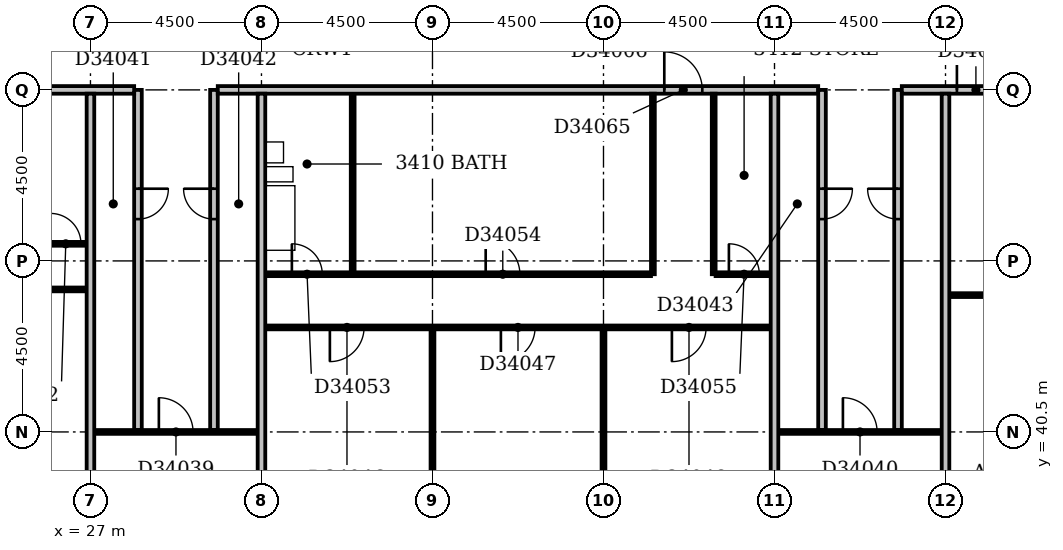
"""IFC4 building model, lengths in metres.
Left out: names, types, materials, properties, quantities, classifications, styles, units other than length and angle.
Written with IfcOpenShell. Run it as: python <this file> out.ifc"""

import sys

from ifc_helpers import new_model, si_unit, direction, frame, frame_2d, origin, place, context, subcontext, project, spatial, rectangle, extrude, element, fill, save


model = new_model("IFC4")
c1 = context("Model", 3, precision=1e-05, world=origin(), true_north=direction((0.0, 1.0)))
c2 = subcontext(c1, "Body", "Model", "MODEL_VIEW")
j1 = project(units=[si_unit("LENGTHUNIT", "METRE"), si_unit("PLANEANGLEUNIT", "RADIAN")], contexts=[c1])
p1 = place(None, origin())
s1 = spatial("IfcSite", under=j1, at=p1, CompositionType="ELEMENT")
p2 = place(p1, origin())
s2 = spatial("IfcBuilding", under=s1, at=p2, CompositionType="ELEMENT")
p3 = place(p2, frame((0.0, 0.0, 137.6)))
s3 = spatial("IfcBuildingStorey", under=s2, at=p3, CompositionType="ELEMENT", Elevation=137.6)
p4 = place(p3, frame((27.0, 36.5, 0.0), z_axis=(0.0, 0.0, 1.0), x_axis=(0.0, 1.0, 0.0)))
e1 = element("IfcWall", 1, at=p4, inside=s3, PredefinedType="PARTITIONING", context=c2, shape_type="SweptSolid", body=[
    extrude(rectangle(XDim=12.9, YDim=0.2, at=frame_2d((6.45, 0.0))), origin(), (0.0, 0.0, 1.0), 2.6),
])
p5 = place(p3, frame((31.5, 36.5, 0.0), z_axis=(0.0, 0.0, 1.0), x_axis=(0.0, 1.0, 0.0)))
e2 = element("IfcWall", 2, at=p5, inside=s3, PredefinedType="PARTITIONING", context=c2, shape_type="SweptSolid", body=[
    extrude(rectangle(XDim=12.9, YDim=0.2, at=frame_2d((6.45, 0.0))), origin(), (0.0, 0.0, 1.0), 3.3),
])
p6 = place(p3, frame((36.0, 36.5, 0.0), z_axis=(0.0, 0.0, 1.0), x_axis=(0.0, 1.0, 0.0)))
e3 = element("IfcWall", 3, at=p6, inside=s3, PredefinedType="PARTITIONING", context=c2, shape_type="SweptSolid", body=[
    extrude(rectangle(XDim=6.7, YDim=0.1, at=frame_2d((3.35, 0.0))), origin(), (0.0, 0.0, 1.0), 2.4),
])
p7 = place(p3, frame((40.5, 36.5, 0.0), z_axis=(0.0, 0.0, 1.0), x_axis=(0.0, 1.0, 0.0)))
e4 = element("IfcWall", 4, at=p7, inside=s3, PredefinedType="PARTITIONING", context=c2, shape_type="SweptSolid", body=[
    extrude(rectangle(XDim=6.7, YDim=0.1, at=frame_2d((3.35, 0.0))), origin(), (0.0, 0.0, 1.0), 3.3),
])
p8 = place(p3, frame((45.0, 36.5, 0.0), z_axis=(0.0, 0.0, 1.0), x_axis=(0.0, 1.0, 0.0)))
e5 = element("IfcWall", 5, at=p8, inside=s3, PredefinedType="PARTITIONING", context=c2, shape_type="SweptSolid", body=[
    extrude(rectangle(XDim=12.9, YDim=0.2, at=frame_2d((6.45, 0.0))), origin(), (0.0, 0.0, 1.0), 2.6),
])
p9 = place(p3, frame((49.5, 36.5, 0.0), z_axis=(0.0, 0.0, 1.0), x_axis=(0.0, 1.0, 0.0)))
e6 = element("IfcWall", 6, at=p9, inside=s3, PredefinedType="PARTITIONING", context=c2, shape_type="SweptSolid", body=[
    extrude(rectangle(XDim=12.9, YDim=0.2, at=frame_2d((6.45, 0.0))), origin(), (0.0, 0.0, 1.0), 3.3),
])
p10 = place(p3, frame((27.1, 40.5, 0.0), z_axis=(0.0, 0.0, 1.0), x_axis=(1.0, 0.0, 0.0)))
e7 = element("IfcWall", 7, at=p10, inside=s3, PredefinedType="PARTITIONING", context=c2, shape_type="SweptSolid", body=[
    extrude(rectangle(XDim=4.3, YDim=0.1, at=frame_2d((2.15, 0.0))), origin(), (0.0, 0.0, 1.0), 3.3),
])
p11 = place(p10, frame((1.7, 0.0, 0.0)))
e8 = element("IfcOpeningElement", 8, at=p11, cuts=e7, PredefinedType="OPENING", context=c2, shape_type="SweptSolid", body=[
    extrude(rectangle(XDim=0.9, YDim=2.1, at=frame_2d((0.45, 1.05))), frame((0.0, 0.062, 0.0), z_axis=(0.0, -1.0, 0.0), x_axis=(1.0, 0.0, 0.0)), (0.0, 0.0, 1.0), 0.124),
])
p12 = place(p3, frame((45.1, 40.5, 0.0), z_axis=(0.0, 0.0, 1.0), x_axis=(1.0, 0.0, 0.0)))
e9 = element("IfcWall", 9, at=p12, inside=s3, PredefinedType="PARTITIONING", context=c2, shape_type="SweptSolid", body=[
    extrude(rectangle(XDim=4.3, YDim=0.1, at=frame_2d((2.15, 0.0))), origin(), (0.0, 0.0, 1.0), 3.3),
])
p13 = place(p12, frame((1.7, 0.0, 0.0)))
e10 = element("IfcOpeningElement", 10, at=p13, cuts=e9, PredefinedType="OPENING", context=c2, shape_type="SweptSolid", body=[
    extrude(rectangle(XDim=0.9, YDim=2.1, at=frame_2d((0.45, 1.05))), frame((0.0, 0.062, 0.0), z_axis=(0.0, -1.0, 0.0), x_axis=(1.0, 0.0, 0.0)), (0.0, 0.0, 1.0), 0.124),
])
p14 = place(p3, frame((28.25, 40.55, 0.0), z_axis=(0.0, 0.0, 1.0), x_axis=(0.0, 1.0, 0.0)))
e11 = element("IfcWall", 11, at=p14, inside=s3, PredefinedType="PARTITIONING", context=c2, shape_type="SweptSolid", body=[
    extrude(rectangle(XDim=8.95, YDim=0.2, at=frame_2d((4.475, 0.0))), origin(), (0.0, 0.0, 1.0), 3.3),
])
p15 = place(p14, frame((5.55, 0.0, 0.0)))
e12 = element("IfcOpeningElement", 12, at=p15, cuts=e11, PredefinedType="OPENING", context=c2, shape_type="SweptSolid", body=[
    extrude(rectangle(XDim=0.8, YDim=2.1, at=frame_2d((0.4, 1.05))), frame((0.0, 0.112, 0.0), z_axis=(0.0, -1.0, 0.0), x_axis=(1.0, 0.0, 0.0)), (0.0, 0.0, 1.0), 0.224),
])
p16 = place(p3, frame((30.25, 40.55, 0.0), z_axis=(0.0, 0.0, 1.0), x_axis=(0.0, 1.0, 0.0)))
e13 = element("IfcWall", 13, at=p16, inside=s3, PredefinedType="PARTITIONING", context=c2, shape_type="SweptSolid", body=[
    extrude(rectangle(XDim=8.95, YDim=0.2, at=frame_2d((4.475, 0.0))), origin(), (0.0, 0.0, 1.0), 3.3),
])
p17 = place(p16, frame((5.55, 0.0, 0.0)))
e14 = element("IfcOpeningElement", 14, at=p17, cuts=e13, PredefinedType="OPENING", context=c2, shape_type="SweptSolid", body=[
    extrude(rectangle(XDim=0.8, YDim=2.1, at=frame_2d((0.4, 1.05))), frame((0.0, 0.112, 0.0), z_axis=(0.0, -1.0, 0.0), x_axis=(1.0, 0.0, 0.0)), (0.0, 0.0, 1.0), 0.224),
])
p18 = place(p3, frame((46.25, 40.55, 0.0), z_axis=(0.0, 0.0, 1.0), x_axis=(0.0, 1.0, 0.0)))
e15 = element("IfcWall", 15, at=p18, inside=s3, PredefinedType="PARTITIONING", context=c2, shape_type="SweptSolid", body=[
    extrude(rectangle(XDim=8.95, YDim=0.2, at=frame_2d((4.475, 0.0))), origin(), (0.0, 0.0, 1.0), 3.3),
])
p19 = place(p18, frame((5.55, 0.0, 0.0)))
e16 = element("IfcOpeningElement", 16, at=p19, cuts=e15, PredefinedType="OPENING", context=c2, shape_type="SweptSolid", body=[
    extrude(rectangle(XDim=0.8, YDim=2.1, at=frame_2d((0.4, 1.05))), frame((0.0, 0.112, 0.0), z_axis=(0.0, -1.0, 0.0), x_axis=(1.0, 0.0, 0.0)), (0.0, 0.0, 1.0), 0.224),
])
p20 = place(p3, frame((48.25, 40.55, 0.0), z_axis=(0.0, 0.0, 1.0), x_axis=(0.0, 1.0, 0.0)))
e17 = element("IfcWall", 17, at=p20, inside=s3, PredefinedType="PARTITIONING", context=c2, shape_type="SweptSolid", body=[
    extrude(rectangle(XDim=8.95, YDim=0.2, at=frame_2d((4.475, 0.0))), origin(), (0.0, 0.0, 1.0), 3.3),
])
p21 = place(p20, frame((5.55, 0.0, 0.0)))
e18 = element("IfcOpeningElement", 18, at=p21, cuts=e17, PredefinedType="OPENING", context=c2, shape_type="SweptSolid", body=[
    extrude(rectangle(XDim=0.8, YDim=2.1, at=frame_2d((0.4, 1.05))), frame((0.0, 0.112, 0.0), z_axis=(0.0, -1.0, 0.0), x_axis=(1.0, 0.0, 0.0)), (0.0, 0.0, 1.0), 0.224),
])
p22 = place(p3, frame((31.6, 43.25, 0.0), z_axis=(0.0, 0.0, 1.0), x_axis=(1.0, 0.0, 0.0)))
e19 = element("IfcWall", 19, at=p22, inside=s3, PredefinedType="PARTITIONING", context=c2, shape_type="SweptSolid", body=[
    extrude(rectangle(XDim=13.3, YDim=0.1, at=frame_2d((6.65, 0.0))), origin(), (0.0, 0.0, 1.0), 3.3),
])
p23 = place(p22, frame((1.7, 0.0, 0.0)))
e20 = element("IfcOpeningElement", 20, at=p23, cuts=e19, PredefinedType="OPENING", context=c2, shape_type="SweptSolid", body=[
    extrude(rectangle(XDim=0.9, YDim=2.1, at=frame_2d((0.45, 1.05))), frame((0.0, 0.062, 0.0), z_axis=(0.0, -1.0, 0.0), x_axis=(1.0, 0.0, 0.0)), (0.0, 0.0, 1.0), 0.124),
])
p24 = place(p22, frame((6.2, 0.0, 0.0)))
e21 = element("IfcOpeningElement", 21, at=p24, cuts=e19, PredefinedType="OPENING", context=c2, shape_type="SweptSolid", body=[
    extrude(rectangle(XDim=0.9, YDim=2.1, at=frame_2d((0.45, 1.05))), frame((0.0, 0.062, 0.0), z_axis=(0.0, -1.0, 0.0), x_axis=(1.0, 0.0, 0.0)), (0.0, 0.0, 1.0), 0.124),
])
p25 = place(p22, frame((10.7, 0.0, 0.0)))
e22 = element("IfcOpeningElement", 22, at=p25, cuts=e19, PredefinedType="OPENING", context=c2, shape_type="SweptSolid", body=[
    extrude(rectangle(XDim=0.9, YDim=2.1, at=frame_2d((0.45, 1.05))), frame((0.0, 0.062, 0.0), z_axis=(0.0, -1.0, 0.0), x_axis=(1.0, 0.0, 0.0)), (0.0, 0.0, 1.0), 0.124),
])
p26 = place(p3, frame((49.6, 44.1, 0.0), z_axis=(0.0, 0.0, 1.0), x_axis=(1.0, 0.0, 0.0)))
e23 = element("IfcWall", 23, at=p26, inside=s3, PredefinedType="PARTITIONING", context=c2, shape_type="SweptSolid", body=[
    extrude(rectangle(XDim=18.5, YDim=0.1, at=frame_2d((9.25, 0.0))), origin(), (0.0, 0.0, 1.0), 3.3),
])
p27 = place(p26, frame((3.95, 0.0, 0.0)))
e24 = element("IfcOpeningElement", 24, at=p27, cuts=e23, PredefinedType="OPENING", context=c2, shape_type="SweptSolid", body=[
    extrude(rectangle(XDim=0.9, YDim=2.1, at=frame_2d((0.45, 1.05))), frame((0.0, 0.062, 0.0), z_axis=(0.0, -1.0, 0.0), x_axis=(1.0, 0.0, 0.0)), (0.0, 0.0, 1.0), 0.124),
])
p28 = place(p26, frame((10.7, 0.0, 0.0)))
e25 = element("IfcOpeningElement", 25, at=p28, cuts=e23, PredefinedType="OPENING", context=c2, shape_type="SweptSolid", body=[
    extrude(rectangle(XDim=0.9, YDim=2.1, at=frame_2d((0.45, 1.05))), frame((0.0, 0.062, 0.0), z_axis=(0.0, -1.0, 0.0), x_axis=(1.0, 0.0, 0.0)), (0.0, 0.0, 1.0), 0.124),
])
p29 = place(p26, frame((14.05, 0.0, 0.0)))
e26 = element("IfcOpeningElement", 26, at=p29, cuts=e23, PredefinedType="OPENING", context=c2, shape_type="SweptSolid", body=[
    extrude(rectangle(XDim=0.9, YDim=2.1, at=frame_2d((0.45, 1.05))), frame((0.0, 0.062, 0.0), z_axis=(0.0, -1.0, 0.0), x_axis=(1.0, 0.0, 0.0)), (0.0, 0.0, 1.0), 0.124),
])
p30 = place(p3, frame((22.6, 44.25, 0.0), z_axis=(0.0, 0.0, 1.0), x_axis=(1.0, 0.0, 0.0)))
e27 = element("IfcWall", 27, at=p30, inside=s3, PredefinedType="PARTITIONING", context=c2, shape_type="SweptSolid", body=[
    extrude(rectangle(XDim=4.3, YDim=0.1, at=frame_2d((2.15, 0.0))), origin(), (0.0, 0.0, 1.0), 3.3),
])
p31 = place(p30, frame((1.7, 0.0, 0.0)))
e28 = element("IfcOpeningElement", 28, at=p31, cuts=e27, PredefinedType="OPENING", context=c2, shape_type="SweptSolid", body=[
    extrude(rectangle(XDim=0.9, YDim=2.1, at=frame_2d((0.45, 1.05))), frame((0.0, 0.062, 0.0), z_axis=(0.0, -1.0, 0.0), x_axis=(1.0, 0.0, 0.0)), (0.0, 0.0, 1.0), 0.124),
])
p32 = place(p3, frame((31.6, 44.65, 0.0), z_axis=(0.0, 0.0, 1.0), x_axis=(1.0, 0.0, 0.0)))
e29 = element("IfcWall", 29, at=p32, inside=s3, PredefinedType="PARTITIONING", context=c2, shape_type="SweptSolid", body=[
    extrude(rectangle(XDim=10.15, YDim=0.1, at=frame_2d((5.075, 0.0))), origin(), (0.0, 0.0, 1.0), 3.3),
])
p33 = place(p32, frame((0.7, 0.0, 0.0)))
e30 = element("IfcOpeningElement", 30, at=p33, cuts=e29, PredefinedType="OPENING", context=c2, shape_type="SweptSolid", body=[
    extrude(rectangle(XDim=0.8, YDim=2.1, at=frame_2d((0.4, 1.05))), frame((0.0, 0.062, 0.0), z_axis=(0.0, -1.0, 0.0), x_axis=(1.0, 0.0, 0.0)), (0.0, 0.0, 1.0), 0.124),
])
p34 = place(p32, frame((5.8, 0.0, 0.0)))
e31 = element("IfcOpeningElement", 31, at=p34, cuts=e29, PredefinedType="OPENING", context=c2, shape_type="SweptSolid", body=[
    extrude(rectangle(XDim=0.9, YDim=2.1, at=frame_2d((0.45, 1.05))), frame((0.0, 0.062, 0.0), z_axis=(0.0, -1.0, 0.0), x_axis=(1.0, 0.0, 0.0)), (0.0, 0.0, 1.0), 0.124),
])
for number, where, z_axis, x_axis in (
    (32, (41.8, 44.65, 0.0), (0.0, 0.0, 1.0), (0.0, 1.0, 0.0)),
    (33, (43.4, 44.65, 0.0), (0.0, 0.0, 1.0), (0.0, 1.0, 0.0)),
):
    element("IfcWall", number, at=place(p3, frame(where, z_axis=z_axis, x_axis=x_axis)), inside=s3, PredefinedType="PARTITIONING", context=c2, shape_type="SweptSolid", body=[
        extrude(rectangle(XDim=4.75, YDim=0.1, at=frame_2d((2.375, 0.0))), origin(), (0.0, 0.0, 1.0), 3.3),
    ])
p35 = place(p3, frame((43.45, 44.65, 0.0), z_axis=(0.0, 0.0, 1.0), x_axis=(1.0, 0.0, 0.0)))
e34 = element("IfcWall", 34, at=p35, inside=s3, PredefinedType="PARTITIONING", context=c2, shape_type="SweptSolid", body=[
    extrude(rectangle(XDim=1.45, YDim=0.1, at=frame_2d((0.725, 0.0))), origin(), (0.0, 0.0, 1.0), 3.3),
])
p36 = place(p35, frame((0.35, 0.0, 0.0)))
e35 = element("IfcOpeningElement", 35, at=p36, cuts=e34, PredefinedType="OPENING", context=c2, shape_type="SweptSolid", body=[
    extrude(rectangle(XDim=0.8, YDim=2.1, at=frame_2d((0.4, 1.05))), frame((0.0, 0.062, 0.0), z_axis=(0.0, -1.0, 0.0), x_axis=(1.0, 0.0, 0.0)), (0.0, 0.0, 1.0), 0.124),
])
p37 = place(p3, frame((33.9, 44.7, 0.0), z_axis=(0.0, 0.0, 1.0), x_axis=(0.0, 1.0, 0.0)))
e36 = element("IfcWall", 36, at=p37, inside=s3, PredefinedType="PLUMBINGWALL", context=c2, shape_type="SweptSolid", body=[
    extrude(rectangle(XDim=4.7, YDim=0.1, at=frame_2d((2.35, 0.0))), origin(), (0.0, 0.0, 1.0), 3.3),
])
p38 = place(p3, frame((25.75, 45.45, 0.0), z_axis=(0.0, 0.0, 1.0), x_axis=(1.0, 0.0, 0.0)))
e37 = element("IfcWall", 37, at=p38, inside=s3, PredefinedType="PARTITIONING", context=c2, shape_type="SweptSolid", body=[
    extrude(rectangle(XDim=1.15, YDim=0.1, at=frame_2d((0.575, 0.0))), origin(), (0.0, 0.0, 1.0), 3.3),
])
p39 = place(p38, frame((0.2, 0.0, 0.0)))
e38 = element("IfcOpeningElement", 38, at=p39, cuts=e37, PredefinedType="OPENING", context=c2, shape_type="SweptSolid", body=[
    extrude(rectangle(XDim=0.8, YDim=2.1, at=frame_2d((0.4, 1.05))), frame((0.0, 0.062, 0.0), z_axis=(0.0, -1.0, 0.0), x_axis=(1.0, 0.0, 0.0)), (0.0, 0.0, 1.0), 0.124),
])
p40 = place(p3, frame((9.1, 49.5, 0.0), z_axis=(0.0, 0.0, 1.0), x_axis=(1.0, 0.0, 0.0)))
e39 = element("IfcWall", 39, at=p40, inside=s3, PredefinedType="PARTITIONING", context=c2, shape_type="SweptSolid", body=[
    extrude(rectangle(XDim=19.05, YDim=0.2, at=frame_2d((9.525, 0.0))), origin(), (0.0, 0.0, 1.0), 3.3),
])
p41 = place(p40, frame((15.35, 0.0, 0.0)))
e40 = element("IfcOpeningElement", 40, at=p41, cuts=e39, PredefinedType="OPENING", context=c2, shape_type="SweptSolid", body=[
    extrude(rectangle(XDim=1.0, YDim=2.1, at=frame_2d((0.5, 1.05))), frame((0.0, 0.112, 0.0), z_axis=(0.0, -1.0, 0.0), x_axis=(1.0, 0.0, 0.0)), (0.0, 0.0, 1.0), 0.224),
])
p42 = place(p40, frame((6.15, 0.0, 0.0)))
e41 = element("IfcOpeningElement", 41, at=p42, cuts=e39, PredefinedType="OPENING", context=c2, shape_type="SweptSolid", body=[
    extrude(rectangle(XDim=0.9, YDim=2.1, at=frame_2d((0.45, 1.05))), frame((0.0, 0.112, 0.0), z_axis=(0.0, -1.0, 0.0), x_axis=(1.0, 0.0, 0.0)), (0.0, 0.0, 1.0), 0.224),
])
p43 = place(p3, frame((30.35, 49.5, 0.0), z_axis=(0.0, 0.0, 1.0), x_axis=(1.0, 0.0, 0.0)))
e42 = element("IfcWall", 42, at=p43, inside=s3, PredefinedType="PARTITIONING", context=c2, shape_type="SweptSolid", body=[
    extrude(rectangle(XDim=15.8, YDim=0.2, at=frame_2d((7.9, 0.0))), origin(), (0.0, 0.0, 1.0), 3.3),
])
p44 = place(p43, frame((11.75, 0.0, 0.0)))
e43 = element("IfcOpeningElement", 43, at=p44, cuts=e42, PredefinedType="OPENING", context=c2, shape_type="SweptSolid", body=[
    extrude(rectangle(XDim=1.0, YDim=2.1, at=frame_2d((0.5, 1.05))), frame((0.0, 0.112, 0.0), z_axis=(0.0, -1.0, 0.0), x_axis=(1.0, 0.0, 0.0)), (0.0, 0.0, 1.0), 0.224),
])
p45 = place(p3, frame((48.35, 49.5, 0.0), z_axis=(0.0, 0.0, 1.0), x_axis=(1.0, 0.0, 0.0)))
e44 = element("IfcWall", 44, at=p45, inside=s3, PredefinedType="PARTITIONING", context=c2, shape_type="SweptSolid", body=[
    extrude(rectangle(XDim=18.65, YDim=0.2, at=frame_2d((9.325, 0.0))), origin(), (0.0, 0.0, 1.0), 3.3),
])
p46 = place(p45, frame((1.45, 0.0, 0.0)))
e45 = element("IfcOpeningElement", 45, at=p46, cuts=e44, PredefinedType="OPENING", context=c2, shape_type="SweptSolid", body=[
    extrude(rectangle(XDim=1.0, YDim=2.1, at=frame_2d((0.5, 1.05))), frame((0.0, 0.112, 0.0), z_axis=(0.0, -1.0, 0.0), x_axis=(1.0, 0.0, 0.0)), (0.0, 0.0, 1.0), 0.224),
])
p47 = place(p11, origin())
e46 = element("IfcDoor", 46, at=p47, inside=s3, OperationType="SINGLE_SWING_LEFT", PredefinedType="DOOR", context=c2, shape_type="SweptSolid", body=[
    extrude(rectangle(XDim=0.9, YDim=2.1, at=frame_2d((0.45, 1.05))), frame((0.0, 0.025, 0.0), z_axis=(0.0, -1.0, 0.0), x_axis=(1.0, 0.0, 0.0)), (0.0, 0.0, 1.0), 0.05),
])
fill(e8, e46)
p48 = place(p13, origin())
e47 = element("IfcDoor", 47, at=p48, inside=s3, OperationType="SINGLE_SWING_LEFT", PredefinedType="DOOR", context=c2, shape_type="SweptSolid", body=[
    extrude(rectangle(XDim=0.9, YDim=2.1, at=frame_2d((0.45, 1.05))), frame((0.0, 0.025, 0.0), z_axis=(0.0, -1.0, 0.0), x_axis=(1.0, 0.0, 0.0)), (0.0, 0.0, 1.0), 0.05),
])
fill(e10, e47)
p49 = place(p15, origin())
e48 = element("IfcDoor", 48, at=p49, inside=s3, OperationType="SINGLE_SWING_RIGHT", PredefinedType="DOOR", context=c2, shape_type="SweptSolid", body=[
    extrude(rectangle(XDim=0.8, YDim=2.1, at=frame_2d((0.4, 1.05))), frame((0.0, 0.025, 0.0), z_axis=(0.0, -1.0, 0.0), x_axis=(1.0, 0.0, 0.0)), (0.0, 0.0, 1.0), 0.05),
])
fill(e12, e48)
p50 = place(p17, frame((0.8, 0.0, 0.0), z_axis=(0.0, 0.0, 1.0), x_axis=(-1.0, 0.0, 0.0)))
e49 = element("IfcDoor", 49, at=p50, inside=s3, OperationType="SINGLE_SWING_LEFT", PredefinedType="DOOR", context=c2, shape_type="SweptSolid", body=[
    extrude(rectangle(XDim=0.8, YDim=2.1, at=frame_2d((0.4, 1.05))), frame((0.0, 0.025, 0.0), z_axis=(0.0, -1.0, 0.0), x_axis=(1.0, 0.0, 0.0)), (0.0, 0.0, 1.0), 0.05),
])
fill(e14, e49)
p51 = place(p19, origin())
e50 = element("IfcDoor", 50, at=p51, inside=s3, OperationType="SINGLE_SWING_RIGHT", PredefinedType="DOOR", context=c2, shape_type="SweptSolid", body=[
    extrude(rectangle(XDim=0.8, YDim=2.1, at=frame_2d((0.4, 1.05))), frame((0.0, 0.025, 0.0), z_axis=(0.0, -1.0, 0.0), x_axis=(1.0, 0.0, 0.0)), (0.0, 0.0, 1.0), 0.05),
])
fill(e16, e50)
p52 = place(p21, frame((0.8, 0.0, 0.0), z_axis=(0.0, 0.0, 1.0), x_axis=(-1.0, 0.0, 0.0)))
e51 = element("IfcDoor", 51, at=p52, inside=s3, OperationType="SINGLE_SWING_LEFT", PredefinedType="DOOR", context=c2, shape_type="SweptSolid", body=[
    extrude(rectangle(XDim=0.8, YDim=2.1, at=frame_2d((0.4, 1.05))), frame((0.0, 0.025, 0.0), z_axis=(0.0, -1.0, 0.0), x_axis=(1.0, 0.0, 0.0)), (0.0, 0.0, 1.0), 0.05),
])
fill(e18, e51)
p53 = place(p23, frame((0.9, 0.0, 0.0), z_axis=(0.0, 0.0, 1.0), x_axis=(-1.0, 0.0, 0.0)))
e52 = element("IfcDoor", 52, at=p53, inside=s3, OperationType="SINGLE_SWING_RIGHT", PredefinedType="DOOR", context=c2, shape_type="SweptSolid", body=[
    extrude(rectangle(XDim=0.9, YDim=2.1, at=frame_2d((0.45, 1.05))), frame((0.0, 0.025, 0.0), z_axis=(0.0, -1.0, 0.0), x_axis=(1.0, 0.0, 0.0)), (0.0, 0.0, 1.0), 0.05),
])
fill(e20, e52)
p54 = place(p24, frame((0.9, 0.0, 0.0), z_axis=(0.0, 0.0, 1.0), x_axis=(-1.0, 0.0, 0.0)))
e53 = element("IfcDoor", 53, at=p54, inside=s3, OperationType="SINGLE_SWING_RIGHT", PredefinedType="DOOR", context=c2, shape_type="SweptSolid", body=[
    extrude(rectangle(XDim=0.9, YDim=2.1, at=frame_2d((0.45, 1.05))), frame((0.0, 0.025, 0.0), z_axis=(0.0, -1.0, 0.0), x_axis=(1.0, 0.0, 0.0)), (0.0, 0.0, 1.0), 0.05),
])
fill(e21, e53)
p55 = place(p25, frame((0.9, 0.0, 0.0), z_axis=(0.0, 0.0, 1.0), x_axis=(-1.0, 0.0, 0.0)))
e54 = element("IfcDoor", 54, at=p55, inside=s3, OperationType="SINGLE_SWING_RIGHT", PredefinedType="DOOR", context=c2, shape_type="SweptSolid", body=[
    extrude(rectangle(XDim=0.9, YDim=2.1, at=frame_2d((0.45, 1.05))), frame((0.0, 0.025, 0.0), z_axis=(0.0, -1.0, 0.0), x_axis=(1.0, 0.0, 0.0)), (0.0, 0.0, 1.0), 0.05),
])
fill(e22, e54)
p56 = place(p33, origin())
e55 = element("IfcDoor", 55, at=p56, inside=s3, OperationType="SINGLE_SWING_LEFT", PredefinedType="DOOR", context=c2, shape_type="SweptSolid", body=[
    extrude(rectangle(XDim=0.8, YDim=2.1, at=frame_2d((0.4, 1.05))), frame((0.0, 0.025, 0.0), z_axis=(0.0, -1.0, 0.0), x_axis=(1.0, 0.0, 0.0)), (0.0, 0.0, 1.0), 0.05),
])
fill(e30, e55)
p57 = place(p34, origin())
e56 = element("IfcDoor", 56, at=p57, inside=s3, OperationType="SINGLE_SWING_LEFT", PredefinedType="DOOR", context=c2, shape_type="SweptSolid", body=[
    extrude(rectangle(XDim=0.9, YDim=2.1, at=frame_2d((0.45, 1.05))), frame((0.0, 0.025, 0.0), z_axis=(0.0, -1.0, 0.0), x_axis=(1.0, 0.0, 0.0)), (0.0, 0.0, 1.0), 0.05),
])
fill(e31, e56)
p58 = place(p36, origin())
e57 = element("IfcDoor", 57, at=p58, inside=s3, OperationType="SINGLE_SWING_LEFT", PredefinedType="DOOR", context=c2, shape_type="SweptSolid", body=[
    extrude(rectangle(XDim=0.8, YDim=2.1, at=frame_2d((0.4, 1.05))), frame((0.0, 0.025, 0.0), z_axis=(0.0, -1.0, 0.0), x_axis=(1.0, 0.0, 0.0)), (0.0, 0.0, 1.0), 0.05),
])
fill(e35, e57)
p59 = place(p39, origin())
e58 = element("IfcDoor", 58, at=p59, inside=s3, OperationType="SINGLE_SWING_LEFT", PredefinedType="DOOR", context=c2, shape_type="SweptSolid", body=[
    extrude(rectangle(XDim=0.8, YDim=2.1, at=frame_2d((0.4, 1.05))), frame((0.0, 0.025, 0.0), z_axis=(0.0, -1.0, 0.0), x_axis=(1.0, 0.0, 0.0)), (0.0, 0.0, 1.0), 0.05),
])
fill(e38, e58)
p60 = place(p44, origin())
e59 = element("IfcDoor", 59, at=p60, inside=s3, OperationType="SINGLE_SWING_LEFT", PredefinedType="DOOR", context=c2, shape_type="SweptSolid", body=[
    extrude(rectangle(XDim=1.0, YDim=2.1, at=frame_2d((0.5, 1.05))), frame((0.0, 0.025, 0.0), z_axis=(0.0, -1.0, 0.0), x_axis=(1.0, 0.0, 0.0)), (0.0, 0.0, 1.0), 0.05),
])
fill(e43, e59)
p61 = place(p46, origin())
e60 = element("IfcDoor", 60, at=p61, inside=s3, OperationType="SINGLE_SWING_LEFT", PredefinedType="DOOR", context=c2, shape_type="SweptSolid", body=[
    extrude(rectangle(XDim=1.0, YDim=2.1, at=frame_2d((0.5, 1.05))), frame((0.0, 0.025, 0.0), z_axis=(0.0, -1.0, 0.0), x_axis=(1.0, 0.0, 0.0)), (0.0, 0.0, 1.0), 0.05),
])
fill(e45, e60)
save(model, sys.argv[1])
